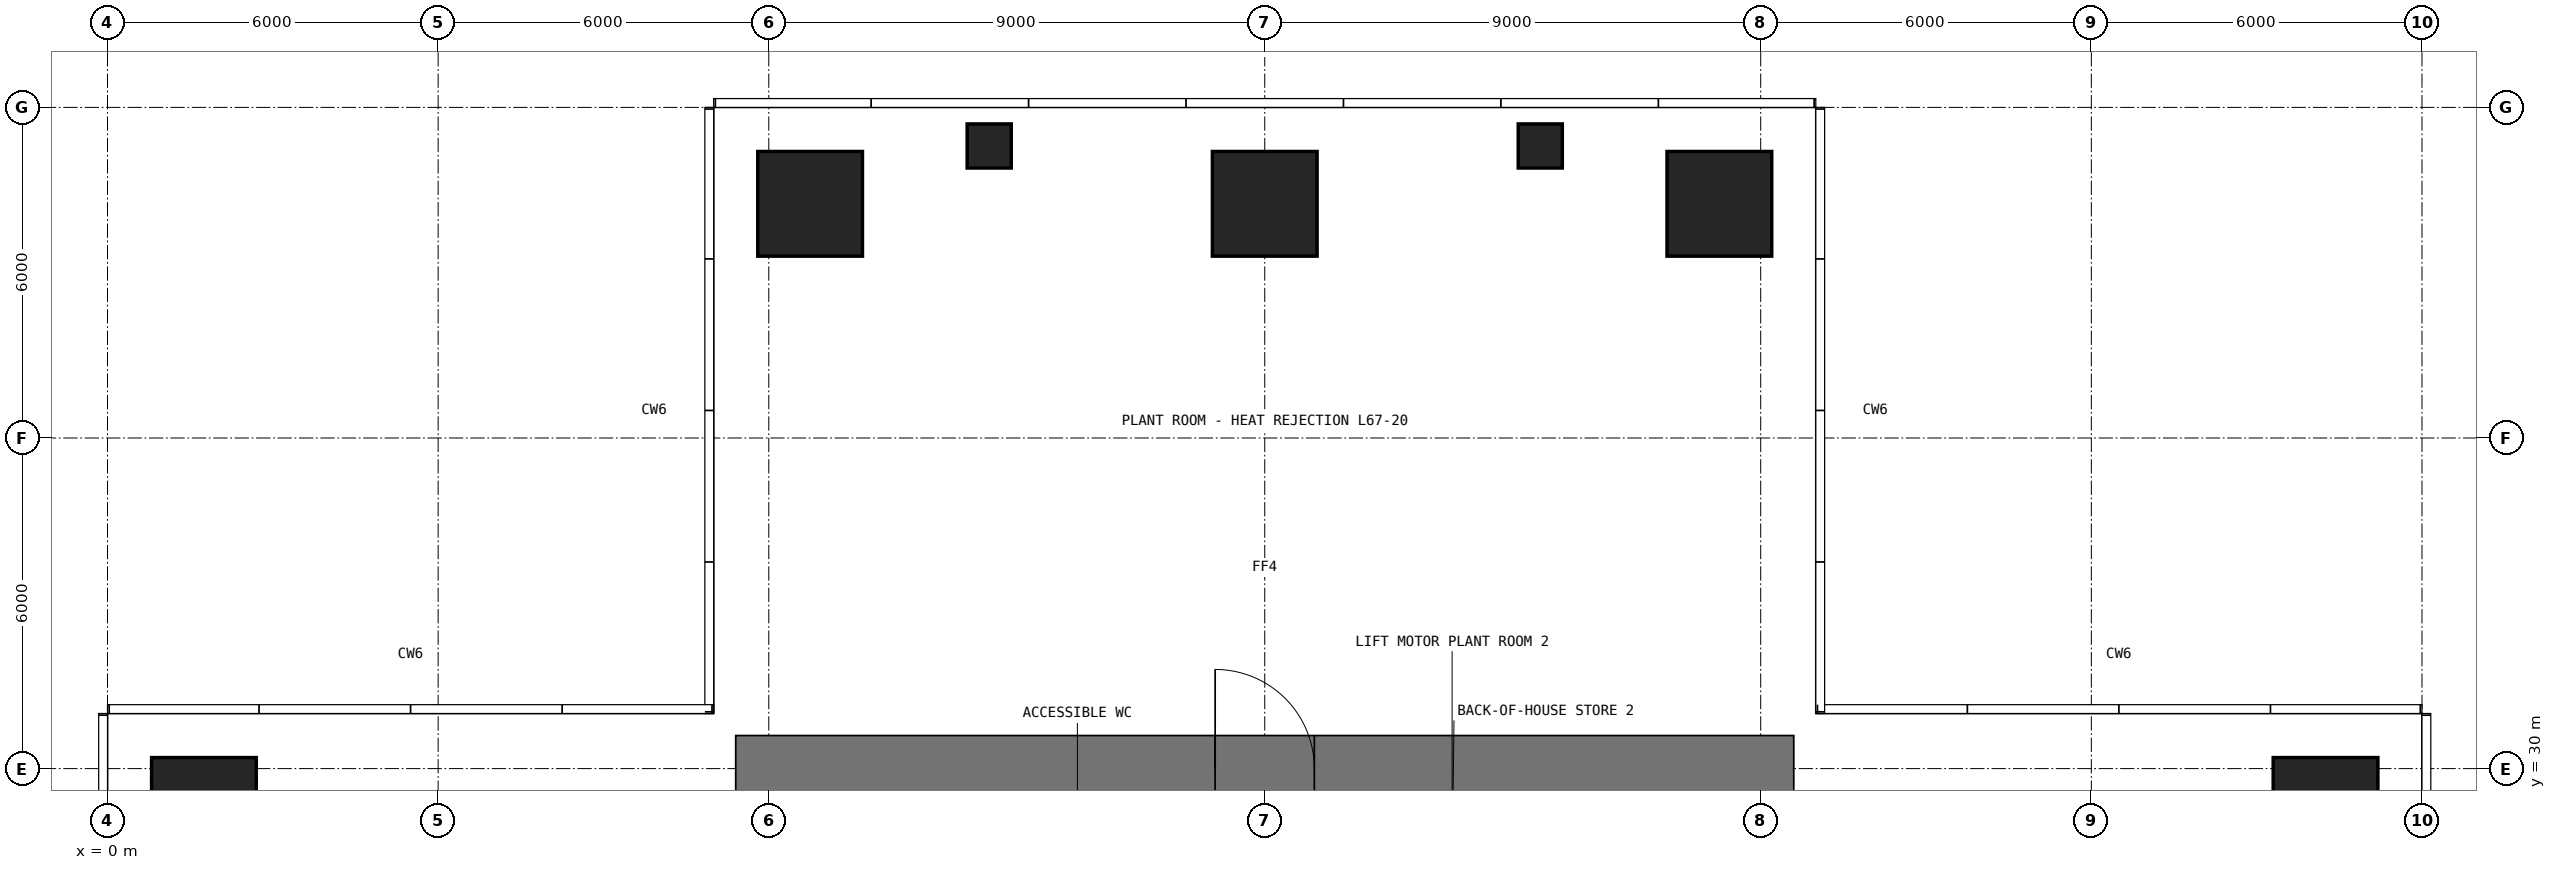
"""IFC4 building model, lengths in metres.
Left out: names, types, materials, properties, quantities, classifications, styles, units other than length and angle.
Written with IfcOpenShell. Run it as: python <this file> out.ifc"""

import sys

from ifc_helpers import new_model, si_unit, direction, frame, frame_2d, origin, origin_2d, place, context, subcontext, project, spatial, rectangle, extrude, element, fill, save


model = new_model("IFC4")
c1 = context("Model", 3, precision=1e-05, world=origin(), true_north=direction((0.0, 1.0)))
c2 = subcontext(c1, "Body", "Model", "MODEL_VIEW")
j1 = project(units=[si_unit("LENGTHUNIT", "METRE"), si_unit("PLANEANGLEUNIT", "RADIAN")], contexts=[c1])
p1 = place(None, origin())
s1 = spatial("IfcSite", under=j1, at=p1, CompositionType="ELEMENT")
p2 = place(p1, origin())
s2 = spatial("IfcBuilding", under=s1, at=p2, CompositionType="ELEMENT")
p3 = place(p2, frame((0.0, 0.0, 283.9)))
s3 = spatial("IfcBuildingStorey", under=s2, at=p3, CompositionType="ELEMENT", Elevation=283.9)
for number, where, z_axis, x_axis in (
    (1, (1.75, 29.25, 0.0), (0.0, 0.0, 1.0), (1.0, 0.0, 0.0)),
    (2, (40.25, 29.25, 0.0), (0.0, 0.0, 1.0), (1.0, 0.0, 0.0)),
    (3, (12.75, 40.25, 0.0), (0.0, 0.0, 1.0), (1.0, 0.0, 0.0)),
):
    element("IfcColumn", number, at=place(p3, frame(where, z_axis=z_axis, x_axis=x_axis)), inside=s3, PredefinedType="COLUMN", context=c2, shape_type="SweptSolid", body=[
        extrude(rectangle(XDim=1.9, YDim=1.9, at=origin_2d()), origin(), (0.0, 0.0, 1.0), 5.85),
    ])
p4 = place(p3, frame((16.0, 41.3, 0.0), z_axis=(0.0, 0.0, 1.0), x_axis=(1.0, 0.0, 0.0)))
e4 = element("IfcColumn", 4, at=p4, inside=s3, PredefinedType="COLUMN", context=c2, shape_type="SweptSolid", body=[
    extrude(rectangle(XDim=0.8, YDim=0.8, at=origin_2d()), origin(), (0.0, 0.0, 1.0), 5.85),
])
p5 = place(p3, frame((21.0, 40.25, 0.0), z_axis=(0.0, 0.0, 1.0), x_axis=(1.0, 0.0, 0.0)))
e5 = element("IfcColumn", 5, at=p5, inside=s3, PredefinedType="COLUMN", context=c2, shape_type="SweptSolid", body=[
    extrude(rectangle(XDim=1.9, YDim=1.9, at=origin_2d()), origin(), (0.0, 0.0, 1.0), 5.85),
])
p6 = place(p3, frame((26.0, 41.3, 0.0), z_axis=(0.0, 0.0, 1.0), x_axis=(1.0, 0.0, 0.0)))
e6 = element("IfcColumn", 6, at=p6, inside=s3, PredefinedType="COLUMN", context=c2, shape_type="SweptSolid", body=[
    extrude(rectangle(XDim=0.8, YDim=0.8, at=origin_2d()), origin(), (0.0, 0.0, 1.0), 5.85),
])
p7 = place(p3, frame((29.25, 40.25, 0.0), z_axis=(0.0, 0.0, 1.0), x_axis=(1.0, 0.0, 0.0)))
e7 = element("IfcColumn", 7, at=p7, inside=s3, PredefinedType="COLUMN", context=c2, shape_type="SweptSolid", body=[
    extrude(rectangle(XDim=1.9, YDim=1.9, at=origin_2d()), origin(), (0.0, 0.0, 1.0), 5.85),
])
p8 = place(p3, frame((11.4, 30.0, -0.1), z_axis=(0.0, 0.0, 1.0), x_axis=(1.0, 0.0, 0.0)))
e8 = element("IfcWall", 8, at=p8, inside=s3, PredefinedType="SHEAR", context=c2, shape_type="SweptSolid", body=[
    extrude(rectangle(XDim=19.2, YDim=1.2, at=frame_2d((9.6, 0.0))), origin(), (0.0, 0.0, 1.0), 5.95),
])
p9 = place(p8, frame((8.7, 0.0, 0.1)))
e9 = element("IfcOpeningElement", 9, at=p9, cuts=e8, PredefinedType="OPENING", context=c2, shape_type="SweptSolid", body=[
    extrude(rectangle(XDim=1.8, YDim=2.4, at=frame_2d((0.9, 1.2))), frame((0.0, 0.61, 0.0), z_axis=(0.0, -1.0, 0.0), x_axis=(1.0, 0.0, 0.0)), (0.0, 0.0, 1.0), 1.22),
])
p10 = place(p9, origin())
e10 = element("IfcDoor", 10, at=p10, inside=s3, OperationType="DOUBLE_DOOR_SINGLE_SWING", PredefinedType="DOOR", context=c2, shape_type="SweptSolid", body=[
    extrude(rectangle(XDim=1.8, YDim=2.4, at=frame_2d((0.9, 1.2))), frame((0.0, 0.325, 0.0), z_axis=(0.0, -1.0, 0.0), x_axis=(1.0, 0.0, 0.0)), (0.0, 0.0, 1.0), 0.05),
])
fill(e9, e10)
save(model, sys.argv[1])
